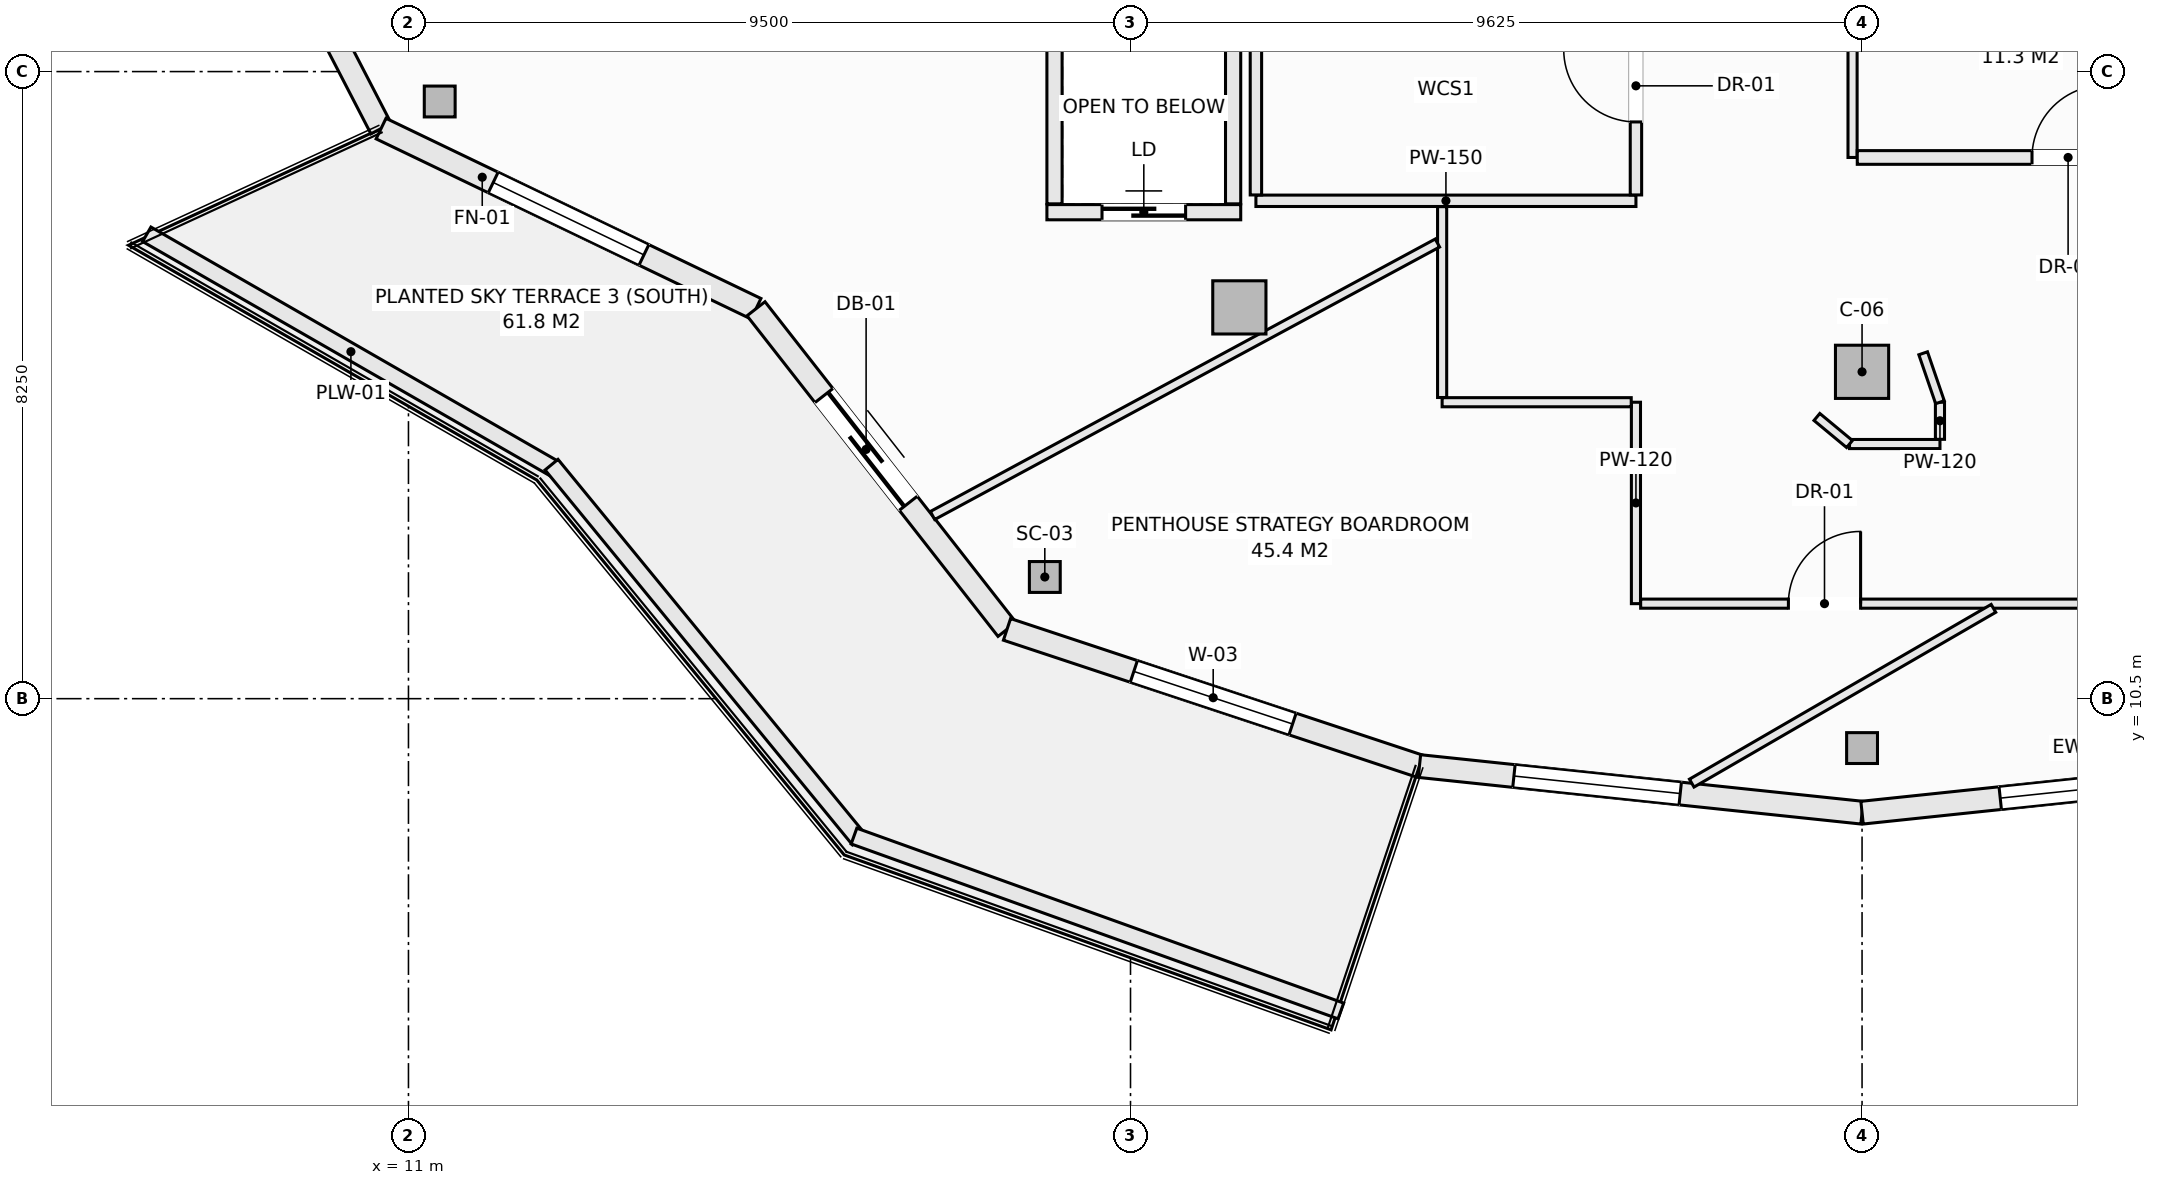
"""IFC4 building model, lengths in metres.
Left out: names, types, materials, properties, quantities, classifications, styles, units other than length and angle.
Written with IfcOpenShell. Run it as: python <this file> out.ifc"""

import sys

from ifc_helpers import new_model, si_unit, direction, frame, frame_2d, origin, origin_2d, place, context, subcontext, project, spatial, rectangle, hollow_rectangle, extrude, element, fill, save


model = new_model("IFC4")
c1 = context("Model", 3, precision=1e-05, world=origin(), true_north=direction((0.0, 1.0)))
c2 = subcontext(c1, "Body", "Model", "MODEL_VIEW")
j1 = project(units=[si_unit("LENGTHUNIT", "METRE"), si_unit("PLANEANGLEUNIT", "RADIAN")], contexts=[c1])
p1 = place(None, origin())
s1 = spatial("IfcSite", under=j1, at=p1, CompositionType="ELEMENT")
p2 = place(p1, origin())
s2 = spatial("IfcBuilding", under=s1, at=p2, CompositionType="ELEMENT")
p3 = place(p2, frame((0.0, 0.0, 249.2)))
s3 = spatial("IfcBuildingStorey", under=s2, at=p3, CompositionType="ELEMENT", Elevation=249.2)
for number, where, z_axis, x_axis in (
    (1, (11.411, 18.356, -0.27), (0.0, 0.0, 1.0), (1.0, 0.0, 0.0)),
    (2, (19.372, 12.101, -0.27), (0.0, 0.0, 1.0), (1.0, 0.0, 0.0)),
    (3, (30.125, 9.85, -0.27), (0.0, 0.0, 1.0), (1.0, 0.0, 0.0)),
):
    element("IfcColumn", number, at=place(p3, frame(where, z_axis=z_axis, x_axis=x_axis)), inside=s3, PredefinedType="COLUMN", context=c2, shape_type="SweptSolid", body=[
        extrude(hollow_rectangle(XDim=0.406, YDim=0.406, WallThickness=0.016, at=origin_2d()), origin(), (0.0, 0.0, 1.0), 3.3),
    ])
for number, where, z_axis, x_axis in (
    (4, (21.932, 15.648, -0.27), (0.0, 0.0, 1.0), (1.0, 0.0, 0.0)),
    (5, (30.125, 14.8, -0.27), (0.0, 0.0, 1.0), (1.0, 0.0, 0.0)),
):
    element("IfcColumn", number, at=place(p3, frame(where, z_axis=z_axis, x_axis=x_axis)), inside=s3, PredefinedType="COLUMN", context=c2, shape_type="SweptSolid", body=[
        extrude(rectangle(XDim=0.7, YDim=0.7, at=origin_2d()), origin(), (0.0, 0.0, 1.0), 3.3),
    ])
p4 = place(p3, frame((8.392, 22.341, 0.0), z_axis=(0.0, 0.0, 1.0), x_axis=(0.459793771602, -0.888025724625, 0.0)))
e6 = element("IfcWall", 6, at=p4, inside=s3, PredefinedType="SOLIDWALL", context=c2, shape_type="SweptSolid", body=[
    extrude(rectangle(XDim=4.889, YDim=0.3, at=frame_2d((2.444, 0.0))), origin(), (0.0, 0.0, 1.0), 2.605),
])
p5 = place(p4, frame((1.344, 0.0, 0.72)))
e7 = element("IfcOpeningElement", 7, at=p5, cuts=e6, PredefinedType="OPENING", context=c2, shape_type="SweptSolid", body=[
    extrude(rectangle(XDim=2.2, YDim=1.65, at=frame_2d((1.1, 0.825))), frame((0.0, 0.16, 0.0), z_axis=(0.0, -1.0, 0.0), x_axis=(1.0, 0.0, 0.0)), (0.0, 0.0, 1.0), 0.32),
])
p6 = place(p3, frame((10.639, 18.0, 0.0), z_axis=(0.0, 0.0, 1.0), x_axis=(0.901355238351, -0.433080517106, 0.0)))
e8 = element("IfcWall", 8, at=p6, inside=s3, PredefinedType="SOLIDWALL", context=c2, shape_type="SweptSolid", body=[
    extrude(rectangle(XDim=5.473, YDim=0.3, at=frame_2d((2.737, 0.0))), origin(), (0.0, 0.0, 1.0), 2.605),
])
p7 = place(p6, frame((1.637, 0.0, 0.72)))
e9 = element("IfcOpeningElement", 9, at=p7, cuts=e8, PredefinedType="OPENING", context=c2, shape_type="SweptSolid", body=[
    extrude(rectangle(XDim=2.2, YDim=1.65, at=frame_2d((1.1, 0.825))), frame((0.0, 0.16, 0.0), z_axis=(0.0, -1.0, 0.0), x_axis=(1.0, 0.0, 0.0)), (0.0, 0.0, 1.0), 0.32),
])
p8 = place(p3, frame((15.573, 15.63, 0.0), z_axis=(0.0, 0.0, 1.0), x_axis=(0.61644588519, -0.787397276241, 0.0)))
e10 = element("IfcWall", 10, at=p8, inside=s3, PredefinedType="SOLIDWALL", context=c2, shape_type="SweptSolid", body=[
    extrude(rectangle(XDim=5.357, YDim=0.3, at=frame_2d((2.678, 0.0))), origin(), (0.0, 0.0, 1.0), 2.605),
])
p9 = place(p8, frame((1.45, 0.0, 0.0)))
e11 = element("IfcOpeningElement", 11, at=p9, cuts=e10, PredefinedType="OPENING", context=c2, shape_type="SweptSolid", body=[
    extrude(rectangle(XDim=1.8, YDim=2.25, at=frame_2d((0.9, 1.125))), frame((0.0, 0.16, 0.0), z_axis=(0.0, -1.0, 0.0), x_axis=(1.0, 0.0, 0.0)), (0.0, 0.0, 1.0), 0.32),
])
p10 = place(p3, frame((18.875, 11.412, 0.0), z_axis=(0.0, 0.0, 1.0), x_axis=(0.949232769585, -0.314574552605, 0.0)))
e12 = element("IfcWall", 12, at=p10, inside=s3, PredefinedType="SOLIDWALL", context=c2, shape_type="SweptSolid", body=[
    extrude(rectangle(XDim=5.717, YDim=0.3, at=frame_2d((2.858, 0.0))), origin(), (0.0, 0.0, 1.0), 2.605),
])
p11 = place(p10, frame((1.758, 0.0, 0.72)))
e13 = element("IfcOpeningElement", 13, at=p11, cuts=e12, PredefinedType="OPENING", context=c2, shape_type="SweptSolid", body=[
    extrude(rectangle(XDim=2.2, YDim=1.65, at=frame_2d((1.1, 0.825))), frame((0.0, 0.16, 0.0), z_axis=(0.0, -1.0, 0.0), x_axis=(1.0, 0.0, 0.0)), (0.0, 0.0, 1.0), 0.32),
])
p12 = place(p3, frame((24.302, 9.613, 0.0), z_axis=(0.0, 0.0, 1.0), x_axis=(0.994500425783, -0.10473253132, 0.0)))
e14 = element("IfcWall", 14, at=p12, inside=s3, PredefinedType="SOLIDWALL", context=c2, shape_type="SweptSolid", body=[
    extrude(rectangle(XDim=5.856, YDim=0.3, at=frame_2d((2.928, 0.0))), origin(), (0.0, 0.0, 1.0), 2.605),
])
p13 = place(p12, frame((1.25, 0.0, 0.72)))
e15 = element("IfcOpeningElement", 15, at=p13, cuts=e14, PredefinedType="OPENING", context=c2, shape_type="SweptSolid", body=[
    extrude(rectangle(XDim=2.2, YDim=1.65, at=frame_2d((1.1, 0.825))), frame((0.0, 0.16, 0.0), z_axis=(0.0, -1.0, 0.0), x_axis=(1.0, 0.0, 0.0)), (0.0, 0.0, 1.0), 0.32),
])
p14 = place(p3, frame((30.125, 9.0, 0.0), z_axis=(0.0, 0.0, 1.0), x_axis=(0.994500425783, 0.10473253132, 0.0)))
e16 = element("IfcWall", 16, at=p14, inside=s3, PredefinedType="SOLIDWALL", context=c2, shape_type="SweptSolid", body=[
    extrude(rectangle(XDim=5.856, YDim=0.3, at=frame_2d((2.928, 0.0))), origin(), (0.0, 0.0, 1.0), 2.605),
])
p15 = place(p14, frame((1.828, 0.0, 0.72)))
e17 = element("IfcOpeningElement", 17, at=p15, cuts=e16, PredefinedType="OPENING", context=c2, shape_type="SweptSolid", body=[
    extrude(rectangle(XDim=2.2, YDim=1.65, at=frame_2d((1.1, 0.825))), frame((0.0, 0.16, 0.0), z_axis=(0.0, -1.0, 0.0), x_axis=(1.0, 0.0, 0.0)), (0.0, 0.0, 1.0), 0.32),
])
p16 = place(p3, frame((7.557, 16.609, 0.0), z_axis=(0.0, 0.0, 1.0), x_axis=(0.866901621005, -0.49847926687, 0.0)))
e18 = element("IfcWall", 18, at=p16, inside=s3, PredefinedType="PARAPET", context=c2, shape_type="SweptSolid", body=[
    extrude(rectangle(XDim=6.197, YDim=0.22, at=frame_2d((3.098, 0.0))), origin(), (0.0, 0.0, 1.0), 0.52),
])
p17 = place(p3, frame((12.882, 13.579, 0.0), z_axis=(0.0, 0.0, 1.0), x_axis=(0.63407318032, -0.77327304492, 0.0)))
e19 = element("IfcWall", 19, at=p17, inside=s3, PredefinedType="PARAPET", context=c2, shape_type="SweptSolid", body=[
    extrude(rectangle(XDim=6.379, YDim=0.22, at=frame_2d((3.189, 0.0))), origin(), (0.0, 0.0, 1.0), 0.52),
])
p18 = place(p3, frame((16.862, 8.692, 0.0), z_axis=(0.0, 0.0, 1.0), x_axis=(0.941139090914, -0.338019543152, 0.0)))
e20 = element("IfcWall", 20, at=p18, inside=s3, PredefinedType="PARAPET", context=c2, shape_type="SweptSolid", body=[
    extrude(rectangle(XDim=6.807, YDim=0.22, at=frame_2d((3.403, 0.0))), origin(), (0.0, 0.0, 1.0), 0.52),
])
p19 = place(p3, frame((19.4, 16.9, 0.0), z_axis=(0.0, 0.0, 1.0), x_axis=(1.0, 0.0, 0.0)))
e21 = element("IfcWall", 21, at=p19, inside=s3, PredefinedType="SOLIDWALL", context=c2, shape_type="SweptSolid", body=[
    extrude(rectangle(XDim=2.55, YDim=0.2, at=frame_2d((1.275, 0.0))), origin(), (0.0, 0.0, 1.0), 3.03),
])
p20 = place(p19, frame((0.725, 0.0, 0.0)))
e22 = element("IfcOpeningElement", 22, at=p20, cuts=e21, PredefinedType="OPENING", context=c2, shape_type="SweptSolid", body=[
    extrude(rectangle(XDim=1.1, YDim=2.2, at=frame_2d((0.55, 1.1))), frame((0.0, 0.11, 0.0), z_axis=(0.0, -1.0, 0.0), x_axis=(1.0, 0.0, 0.0)), (0.0, 0.0, 1.0), 0.22),
])
for number, where, z_axis, x_axis in (
    (23, (19.5, 17.01, 0.0), (0.0, 0.0, 1.0), (0.0, 1.0, 0.0)),
    (24, (21.85, 17.01, 0.0), (0.0, 0.0, 1.0), (0.0, 1.0, 0.0)),
):
    element("IfcWall", number, at=place(p3, frame(where, z_axis=z_axis, x_axis=x_axis)), inside=s3, PredefinedType="SOLIDWALL", context=c2, shape_type="SweptSolid", body=[
        extrude(rectangle(XDim=2.53, YDim=0.2, at=frame_2d((1.265, 0.0))), origin(), (0.0, 0.0, 1.0), 3.03),
    ])
p21 = place(p3, frame((22.15, 17.05, 0.0), z_axis=(0.0, 0.0, 1.0), x_axis=(1.0, 0.0, 0.0)))
e25 = element("IfcWall", 25, at=p21, inside=s3, PredefinedType="PARTITIONING", context=c2, shape_type="SweptSolid", body=[
    extrude(rectangle(XDim=5.0, YDim=0.15, at=frame_2d((2.5, 0.0))), origin(), (0.0, 0.0, 1.0), 3.03),
])
p22 = place(p3, frame((22.15, 17.127, 0.0), z_axis=(0.0, 0.0, 1.0), x_axis=(0.0, 1.0, 0.0)))
e26 = element("IfcWall", 26, at=p22, inside=s3, PredefinedType="PARTITIONING", context=c2, shape_type="SweptSolid", body=[
    extrude(rectangle(XDim=2.823, YDim=0.15, at=frame_2d((1.412, 0.0))), origin(), (0.0, 0.0, 1.0), 3.03),
])
p23 = place(p3, frame((27.15, 11.75, 0.0), z_axis=(0.0, 0.0, 1.0), x_axis=(0.0, 1.0, 0.0)))
e27 = element("IfcWall", 27, at=p23, inside=s3, PredefinedType="PARTITIONING", context=c2, shape_type="SweptSolid", body=[
    extrude(rectangle(XDim=2.65, YDim=0.12, at=frame_2d((1.325, 0.0))), origin(), (0.0, 0.0, 1.0), 3.03),
])
p24 = place(p3, frame((27.15, 17.127, 0.0), z_axis=(0.0, 0.0, 1.0), x_axis=(0.0, 1.0, 0.0)))
e28 = element("IfcWall", 28, at=p24, inside=s3, PredefinedType="PARTITIONING", context=c2, shape_type="SweptSolid", body=[
    extrude(rectangle(XDim=2.871, YDim=0.15, at=frame_2d((1.436, 0.0))), origin(), (0.0, 0.0, 1.0), 3.03),
])
p25 = place(p24, frame((0.96, 0.0, 0.0)))
e29 = element("IfcOpeningElement", 29, at=p25, cuts=e28, PredefinedType="OPENING", context=c2, shape_type="SweptSolid", body=[
    extrude(rectangle(XDim=0.95, YDim=2.1, at=frame_2d((0.475, 1.05))), frame((0.0, 0.085, 0.0), z_axis=(0.0, -1.0, 0.0), x_axis=(1.0, 0.0, 0.0)), (0.0, 0.0, 1.0), 0.17),
])
p26 = place(p3, frame((30.0, 17.62, 0.0), z_axis=(0.0, 0.0, 1.0), x_axis=(0.0, 1.0, 0.0)))
e30 = element("IfcWall", 30, at=p26, inside=s3, PredefinedType="PARTITIONING", context=c2, shape_type="SweptSolid", body=[
    extrude(rectangle(XDim=2.18, YDim=0.12, at=frame_2d((1.09, 0.0))), origin(), (0.0, 0.0, 1.0), 3.03),
])
p27 = place(p3, frame((30.062, 17.62, 0.0), z_axis=(0.0, 0.0, 1.0), x_axis=(1.0, 0.0, 0.0)))
e31 = element("IfcWall", 31, at=p27, inside=s3, PredefinedType="SOLIDWALL", context=c2, shape_type="SweptSolid", body=[
    extrude(rectangle(XDim=8.646, YDim=0.18, at=frame_2d((4.323, 0.0))), origin(), (0.0, 0.0, 1.0), 3.03),
])
p28 = place(p27, frame((2.299, 0.0, 0.0)))
e32 = element("IfcOpeningElement", 32, at=p28, cuts=e31, PredefinedType="OPENING", context=c2, shape_type="SweptSolid", body=[
    extrude(rectangle(XDim=0.95, YDim=2.1, at=frame_2d((0.475, 1.05))), frame((0.0, 0.1, 0.0), z_axis=(0.0, -1.0, 0.0), x_axis=(1.0, 0.0, 0.0)), (0.0, 0.0, 1.0), 0.2),
])
p29 = place(p3, frame((24.6, 14.4, 0.0), z_axis=(0.0, 0.0, 1.0), x_axis=(1.0, 0.0, 0.0)))
e33 = element("IfcWall", 33, at=p29, inside=s3, PredefinedType="PARTITIONING", context=c2, shape_type="SweptSolid", body=[
    extrude(rectangle(XDim=2.488, YDim=0.12, at=frame_2d((1.244, 0.0))), origin(), (0.0, 0.0, 1.0), 3.03),
])
p30 = place(p3, frame((27.212, 11.75, 0.0), z_axis=(0.0, 0.0, 1.0), x_axis=(1.0, 0.0, 0.0)))
e34 = element("IfcWall", 34, at=p30, inside=s3, PredefinedType="PARTITIONING", context=c2, shape_type="SweptSolid", body=[
    extrude(rectangle(XDim=7.256, YDim=0.12, at=frame_2d((3.628, 0.0))), origin(), (0.0, 0.0, 1.0), 3.03),
])
p31 = place(p30, frame((1.944, 0.0, 0.0)))
e35 = element("IfcOpeningElement", 35, at=p31, cuts=e34, PredefinedType="OPENING", context=c2, shape_type="SweptSolid", body=[
    extrude(rectangle(XDim=0.95, YDim=2.1, at=frame_2d((0.475, 1.05))), frame((0.0, 0.07, 0.0), z_axis=(0.0, -1.0, 0.0), x_axis=(1.0, 0.0, 0.0)), (0.0, 0.0, 1.0), 0.14),
])
p32 = place(p3, frame((24.6, 14.462, 0.0), z_axis=(0.0, 0.0, 1.0), x_axis=(0.0, 1.0, 0.0)))
e36 = element("IfcWall", 36, at=p32, inside=s3, PredefinedType="PARTITIONING", context=c2, shape_type="SweptSolid", body=[
    extrude(rectangle(XDim=2.511, YDim=0.12, at=frame_2d((1.255, 0.0))), origin(), (0.0, 0.0, 1.0), 3.03),
])
p33 = place(p3, frame((29.96, 13.85, 0.0), z_axis=(0.0, 0.0, 1.0), x_axis=(1.0, 0.0, 0.0)))
e37 = element("IfcWall", 37, at=p33, inside=s3, PredefinedType="PARTITIONING", context=c2, shape_type="SweptSolid", body=[
    extrude(rectangle(XDim=1.19, YDim=0.12, at=frame_2d((0.595, 0.0))), origin(), (0.0, 0.0, 1.0), 3.03),
])
p34 = place(p3, frame((31.15, 13.912, 0.0), z_axis=(0.0, 0.0, 1.0), x_axis=(0.0, 1.0, 0.0)))
e38 = element("IfcWall", 38, at=p34, inside=s3, PredefinedType="PARTITIONING", context=c2, shape_type="SweptSolid", body=[
    extrude(rectangle(XDim=0.488, YDim=0.12, at=frame_2d((0.244, 0.0))), origin(), (0.0, 0.0, 1.0), 3.03),
])
p35 = place(p3, frame((30.929, 15.044, 0.0), z_axis=(0.0, 0.0, 1.0), x_axis=(0.324498492416, -0.945886213252, 0.0)))
e39 = element("IfcWall", 39, at=p35, inside=s3, PredefinedType="PARTITIONING", context=c2, shape_type="SweptSolid", body=[
    extrude(rectangle(XDim=0.681, YDim=0.12, at=frame_2d((0.34, 0.0))), origin(), (0.0, 0.0, 1.0), 3.03),
])
p36 = place(p3, frame((29.531, 14.206, 0.0), z_axis=(0.0, 0.0, 1.0), x_axis=(0.7695479554, -0.638589026166, 0.0)))
e40 = element("IfcWall", 40, at=p36, inside=s3, PredefinedType="PARTITIONING", context=c2, shape_type="SweptSolid", body=[
    extrude(rectangle(XDim=0.557, YDim=0.12, at=frame_2d((0.279, 0.0))), origin(), (0.0, 0.0, 1.0), 3.03),
])
p37 = place(p3, frame((17.895, 12.91, 0.0), z_axis=(0.0, 0.0, 1.0), x_axis=(0.880038694226, 0.474901986377, 0.0)))
e41 = element("IfcWall", 41, at=p37, inside=s3, PredefinedType="PARTITIONING", context=c2, shape_type="SweptSolid", body=[
    extrude(rectangle(XDim=7.548, YDim=0.12, at=frame_2d((3.774, 0.0))), origin(), (0.0, 0.0, 1.0), 2.478),
])
p38 = place(p3, frame((27.884, 9.389, 0.0), z_axis=(0.0, 0.0, 1.0), x_axis=(0.865363124713, 0.501145350558, 0.0)))
e42 = element("IfcWall", 42, at=p38, inside=s3, PredefinedType="PARTITIONING", context=c2, shape_type="SweptSolid", body=[
    extrude(rectangle(XDim=4.588, YDim=0.12, at=frame_2d((2.294, 0.0))), origin(), (0.0, 0.0, 1.0), 3.03),
])
p39 = place(p7, origin())
e43 = element("IfcWindow", 43, at=p39, inside=s3, PartitioningType="SINGLE_PANEL", PredefinedType="WINDOW", context=c2, shape_type="SweptSolid", body=[
    extrude(rectangle(XDim=2.2, YDim=1.65, at=frame_2d((1.1, 0.825))), frame((0.0, 0.03, 0.0), z_axis=(0.0, -1.0, 0.0), x_axis=(1.0, 0.0, 0.0)), (0.0, 0.0, 1.0), 0.06),
])
fill(e9, e43)
p40 = place(p9, frame((1.8, 0.0, 0.0), z_axis=(0.0, 0.0, 1.0), x_axis=(-1.0, 0.0, 0.0)))
e44 = element("IfcDoor", 44, at=p40, inside=s3, OperationType="SLIDING_TO_LEFT", PredefinedType="DOOR", context=c2, shape_type="SweptSolid", body=[
    extrude(rectangle(XDim=1.8, YDim=2.25, at=frame_2d((0.9, 1.125))), frame((0.0, 0.025, 0.0), z_axis=(0.0, -1.0, 0.0), x_axis=(1.0, 0.0, 0.0)), (0.0, 0.0, 1.0), 0.05),
])
fill(e11, e44)
p41 = place(p11, origin())
e45 = element("IfcWindow", 45, at=p41, inside=s3, PartitioningType="SINGLE_PANEL", PredefinedType="WINDOW", context=c2, shape_type="SweptSolid", body=[
    extrude(rectangle(XDim=2.2, YDim=1.65, at=frame_2d((1.1, 0.825))), frame((0.0, 0.03, 0.0), z_axis=(0.0, -1.0, 0.0), x_axis=(1.0, 0.0, 0.0)), (0.0, 0.0, 1.0), 0.06),
])
fill(e13, e45)
p42 = place(p13, origin())
e46 = element("IfcWindow", 46, at=p42, inside=s3, PartitioningType="SINGLE_PANEL", PredefinedType="WINDOW", context=c2, shape_type="SweptSolid", body=[
    extrude(rectangle(XDim=2.2, YDim=1.65, at=frame_2d((1.1, 0.825))), frame((0.0, 0.03, 0.0), z_axis=(0.0, -1.0, 0.0), x_axis=(1.0, 0.0, 0.0)), (0.0, 0.0, 1.0), 0.06),
])
fill(e15, e46)
p43 = place(p15, origin())
e47 = element("IfcWindow", 47, at=p43, inside=s3, PartitioningType="SINGLE_PANEL", PredefinedType="WINDOW", context=c2, shape_type="SweptSolid", body=[
    extrude(rectangle(XDim=2.2, YDim=1.65, at=frame_2d((1.1, 0.825))), frame((0.0, 0.03, 0.0), z_axis=(0.0, -1.0, 0.0), x_axis=(1.0, 0.0, 0.0)), (0.0, 0.0, 1.0), 0.06),
])
fill(e17, e47)
p44 = place(p20, origin())
e48 = element("IfcDoor", 48, at=p44, inside=s3, OperationType="SLIDING_TO_LEFT", PredefinedType="DOOR", context=c2, shape_type="SweptSolid", body=[
    extrude(rectangle(XDim=1.1, YDim=2.2, at=frame_2d((0.55, 1.1))), frame((0.0, 0.025, 0.0), z_axis=(0.0, -1.0, 0.0), x_axis=(1.0, 0.0, 0.0)), (0.0, 0.0, 1.0), 0.05),
])
fill(e22, e48)
p45 = place(p25, origin())
e49 = element("IfcDoor", 49, at=p45, inside=s3, OperationType="SINGLE_SWING_RIGHT", PredefinedType="DOOR", context=c2, shape_type="SweptSolid", body=[
    extrude(rectangle(XDim=0.95, YDim=2.1, at=frame_2d((0.475, 1.05))), frame((0.0, 0.025, 0.0), z_axis=(0.0, -1.0, 0.0), x_axis=(1.0, 0.0, 0.0)), (0.0, 0.0, 1.0), 0.05),
])
fill(e29, e49)
p46 = place(p28, origin())
e50 = element("IfcDoor", 50, at=p46, inside=s3, OperationType="SINGLE_SWING_RIGHT", PredefinedType="DOOR", context=c2, shape_type="SweptSolid", body=[
    extrude(rectangle(XDim=0.95, YDim=2.1, at=frame_2d((0.475, 1.05))), frame((0.0, 0.025, 0.0), z_axis=(0.0, -1.0, 0.0), x_axis=(1.0, 0.0, 0.0)), (0.0, 0.0, 1.0), 0.05),
])
fill(e32, e50)
p47 = place(p31, origin())
e51 = element("IfcDoor", 51, at=p47, inside=s3, OperationType="SINGLE_SWING_RIGHT", PredefinedType="DOOR", context=c2, shape_type="SweptSolid", body=[
    extrude(rectangle(XDim=0.95, YDim=2.1, at=frame_2d((0.475, 1.05))), frame((0.0, 0.025, 0.0), z_axis=(0.0, -1.0, 0.0), x_axis=(1.0, 0.0, 0.0)), (0.0, 0.0, 1.0), 0.05),
])
fill(e35, e51)
save(model, sys.argv[1])
